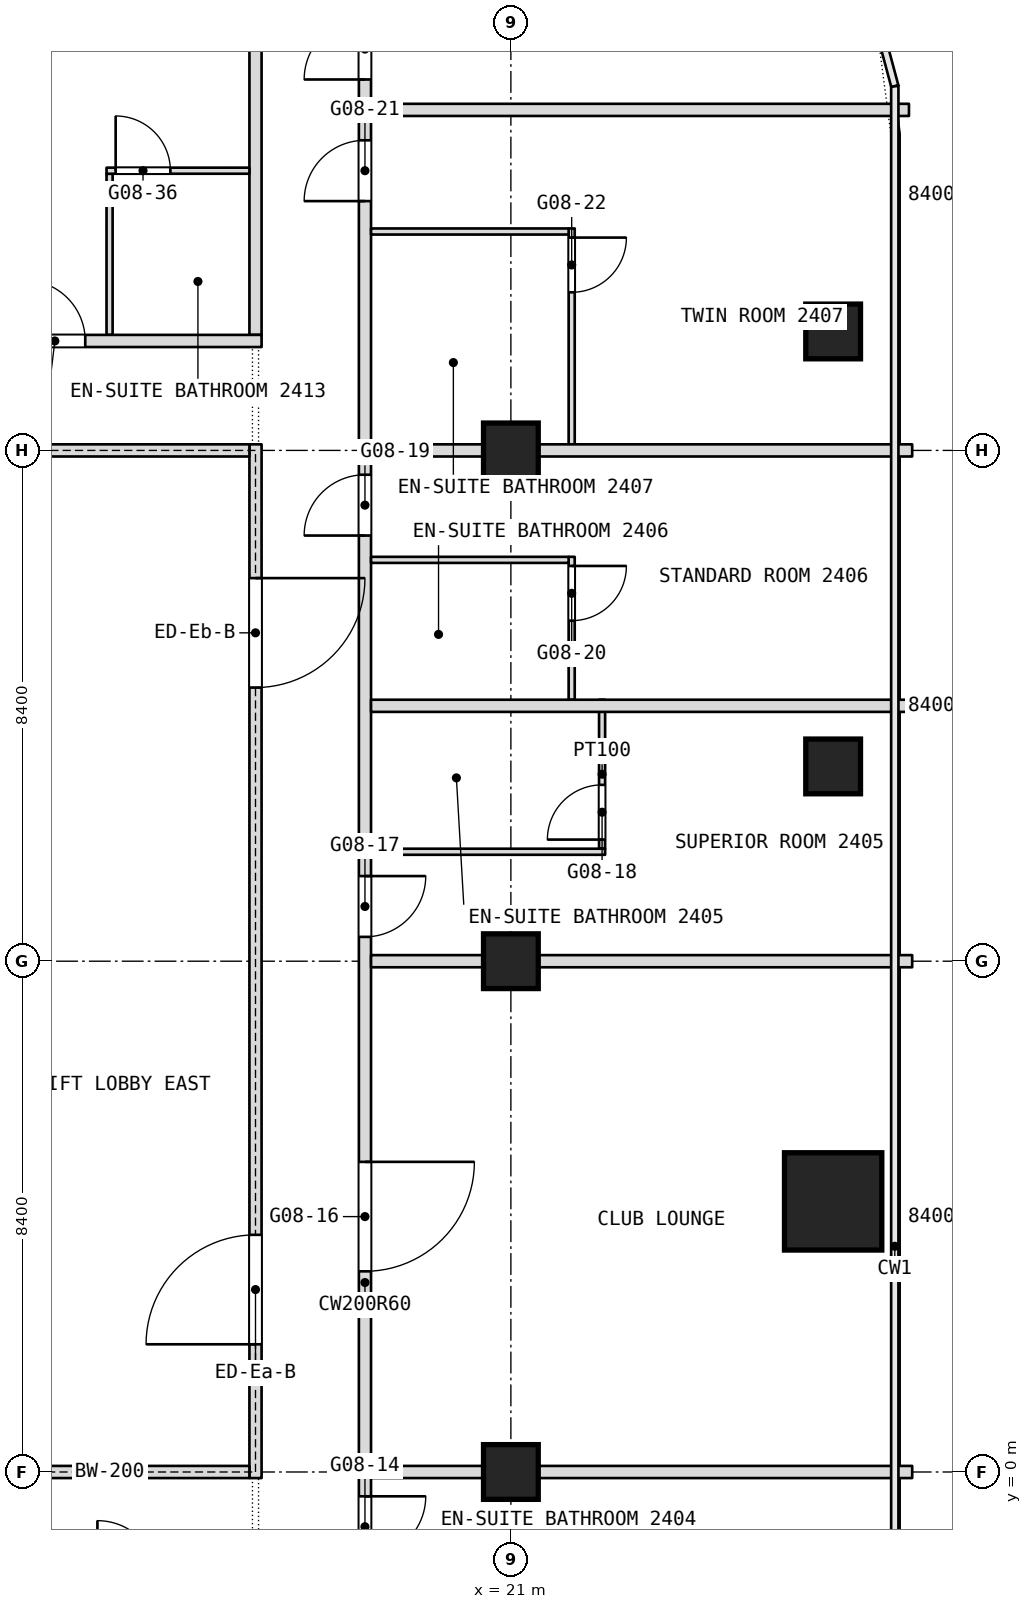
"""IFC4 building model, lengths in metres.
Left out: names, types, materials, properties, quantities, classifications, styles, units other than length and angle.
Written with IfcOpenShell. Run it as: python <this file> out.ifc"""

import sys

from ifc_helpers import new_model, si_unit, direction, frame, frame_2d, origin, origin_2d, place, context, subcontext, project, spatial, rectangle, extrude, element, fill, save


model = new_model("IFC4")
c1 = context("Model", 3, precision=1e-05, world=origin(), true_north=direction((0.0, 1.0)))
c2 = subcontext(c1, "Body", "Model", "MODEL_VIEW")
j1 = project(units=[si_unit("LENGTHUNIT", "METRE"), si_unit("PLANEANGLEUNIT", "RADIAN")], contexts=[c1])
p1 = place(None, origin())
s1 = spatial("IfcSite", under=j1, at=p1, CompositionType="ELEMENT")
p2 = place(p1, origin())
s2 = spatial("IfcBuilding", under=s1, at=p2, CompositionType="ELEMENT")
p3 = place(p2, frame((0.0, 0.0, 112.1)))
s3 = spatial("IfcBuildingStorey", under=s2, at=p3, CompositionType="ELEMENT", Elevation=112.1)
p4 = place(p3, frame((26.3, 4.45, 0.0), z_axis=(0.0, 0.0, 1.0), x_axis=(1.0, 0.0, 0.0)))
e1 = element("IfcColumn", 1, at=p4, inside=s3, PredefinedType="COLUMN", context=c2, shape_type="SweptSolid", body=[
    extrude(rectangle(XDim=1.6, YDim=1.6, at=origin_2d()), origin(), (0.0, 0.0, 1.0), 3.6),
])
for number, where, z_axis, x_axis in (
    (2, (21.0, 0.0, 0.0), (0.0, 0.0, 1.0), (1.0, 0.0, 0.0)),
    (3, (21.0, 8.4, 0.0), (0.0, 0.0, 1.0), (1.0, 0.0, 0.0)),
    (4, (21.0, 16.8, 0.0), (0.0, 0.0, 1.0), (1.0, 0.0, 0.0)),
    (5, (26.3, 18.756, 0.0), (0.0, 0.0, 1.0), (1.0, 0.0, 0.0)),
    (6, (26.3, 11.603, 0.0), (0.0, 0.0, 1.0), (1.0, 0.0, 0.0)),
):
    element("IfcColumn", number, at=place(p3, frame(where, z_axis=z_axis, x_axis=x_axis)), inside=s3, PredefinedType="COLUMN", context=c2, shape_type="SweptSolid", body=[
        extrude(rectangle(XDim=0.9, YDim=0.9, at=origin_2d()), origin(), (0.0, 0.0, 1.0), 3.6),
    ])
p5 = place(p3, frame((22.5, 10.25, 0.0), z_axis=(0.0, 0.0, 1.0), x_axis=(0.0, 1.0, 0.0)))
e7 = element("IfcWall", 7, at=p5, inside=s3, PredefinedType="PARTITIONING", context=c2, shape_type="SweptSolid", body=[
    extrude(rectangle(XDim=2.45, YDim=0.1, at=frame_2d((1.225, 0.0))), origin(), (0.0, 0.0, 1.0), 3.34),
])
p6 = place(p5, frame((0.15, 0.0, 0.0)))
e8 = element("IfcOpeningElement", 8, at=p6, cuts=e7, PredefinedType="OPENING", context=c2, shape_type="SweptSolid", body=[
    extrude(rectangle(XDim=0.9, YDim=2.1, at=frame_2d((0.45, 1.05))), frame((0.0, 0.05, 0.0), z_axis=(0.0, -1.0, 0.0), x_axis=(1.0, 0.0, 0.0)), (0.0, 0.0, 1.0), 0.1),
])
p7 = place(p3, frame((22.0, 12.7, 0.0), z_axis=(0.0, 0.0, 1.0), x_axis=(0.0, 1.0, 0.0)))
e9 = element("IfcWall", 9, at=p7, inside=s3, PredefinedType="PARTITIONING", context=c2, shape_type="SweptSolid", body=[
    extrude(rectangle(XDim=2.35, YDim=0.1, at=frame_2d((1.175, 0.0))), origin(), (0.0, 0.0, 1.0), 3.34),
])
p8 = place(p7, frame((1.3, 0.0, 0.0)))
e10 = element("IfcOpeningElement", 10, at=p8, cuts=e9, PredefinedType="OPENING", context=c2, shape_type="SweptSolid", body=[
    extrude(rectangle(XDim=0.9, YDim=2.1, at=frame_2d((0.45, 1.05))), frame((0.0, 0.05, 0.0), z_axis=(0.0, -1.0, 0.0), x_axis=(1.0, 0.0, 0.0)), (0.0, 0.0, 1.0), 0.1),
])
p9 = place(p3, frame((22.0, 16.9, 0.0), z_axis=(0.0, 0.0, 1.0), x_axis=(0.0, 1.0, 0.0)))
e11 = element("IfcWall", 11, at=p9, inside=s3, PredefinedType="PARTITIONING", context=c2, shape_type="SweptSolid", body=[
    extrude(rectangle(XDim=3.55, YDim=0.1, at=frame_2d((1.775, 0.0))), origin(), (0.0, 0.0, 1.0), 3.34),
])
p10 = place(p9, frame((2.5, 0.0, 0.0)))
e12 = element("IfcOpeningElement", 12, at=p10, cuts=e11, PredefinedType="OPENING", context=c2, shape_type="SweptSolid", body=[
    extrude(rectangle(XDim=0.9, YDim=2.1, at=frame_2d((0.45, 1.05))), frame((0.0, 0.05, 0.0), z_axis=(0.0, -1.0, 0.0), x_axis=(1.0, 0.0, 0.0)), (0.0, 0.0, 1.0), 0.1),
])
p11 = place(p3, frame((18.6, -21.708, 0.0), z_axis=(0.0, 0.0, 1.0), x_axis=(0.0, 1.0, 0.0)))
e13 = element("IfcWall", 13, at=p11, inside=s3, PredefinedType="PARTITIONING", context=c2, shape_type="SweptSolid", body=[
    extrude(rectangle(XDim=49.648, YDim=0.2, at=frame_2d((24.824, 0.0))), origin(), (0.0, 0.0, 1.0), 3.34),
])
p12 = place(p11, frame((2.204, 0.0, 0.0)))
e14 = element("IfcOpeningElement", 14, at=p12, cuts=e13, PredefinedType="OPENING", context=c2, shape_type="SweptSolid", body=[
    extrude(rectangle(XDim=1.0, YDim=2.1, at=frame_2d((0.5, 1.05))), frame((0.0, 0.1, 0.0), z_axis=(0.0, -1.0, 0.0), x_axis=(1.0, 0.0, 0.0)), (0.0, 0.0, 1.0), 0.2),
])
p13 = place(p11, frame((7.708, 0.0, 0.0)))
e15 = element("IfcOpeningElement", 15, at=p13, cuts=e13, PredefinedType="OPENING", context=c2, shape_type="SweptSolid", body=[
    extrude(rectangle(XDim=1.0, YDim=2.1, at=frame_2d((0.5, 1.05))), frame((0.0, 0.1, 0.0), z_axis=(0.0, -1.0, 0.0), x_axis=(1.0, 0.0, 0.0)), (0.0, 0.0, 1.0), 0.2),
])
p14 = place(p11, frame((9.508, 0.0, 0.0)))
e16 = element("IfcOpeningElement", 16, at=p14, cuts=e13, PredefinedType="OPENING", context=c2, shape_type="SweptSolid", body=[
    extrude(rectangle(XDim=1.0, YDim=2.1, at=frame_2d((0.5, 1.05))), frame((0.0, 0.1, 0.0), z_axis=(0.0, -1.0, 0.0), x_axis=(1.0, 0.0, 0.0)), (0.0, 0.0, 1.0), 0.2),
])
p15 = place(p11, frame((13.708, 0.0, 0.0)))
e17 = element("IfcOpeningElement", 17, at=p15, cuts=e13, PredefinedType="OPENING", context=c2, shape_type="SweptSolid", body=[
    extrude(rectangle(XDim=1.0, YDim=2.1, at=frame_2d((0.5, 1.05))), frame((0.0, 0.1, 0.0), z_axis=(0.0, -1.0, 0.0), x_axis=(1.0, 0.0, 0.0)), (0.0, 0.0, 1.0), 0.2),
])
p16 = place(p11, frame((20.308, 0.0, 0.0)))
e18 = element("IfcOpeningElement", 18, at=p16, cuts=e13, PredefinedType="OPENING", context=c2, shape_type="SweptSolid", body=[
    extrude(rectangle(XDim=1.0, YDim=2.1, at=frame_2d((0.5, 1.05))), frame((0.0, 0.1, 0.0), z_axis=(0.0, -1.0, 0.0), x_axis=(1.0, 0.0, 0.0)), (0.0, 0.0, 1.0), 0.2),
])
p17 = place(p11, frame((25.008, 0.0, 0.0)))
e19 = element("IfcOpeningElement", 19, at=p17, cuts=e13, PredefinedType="OPENING", context=c2, shape_type="SweptSolid", body=[
    extrude(rectangle(XDim=1.8, YDim=2.1, at=frame_2d((0.9, 1.05))), frame((0.0, 0.1, 0.0), z_axis=(0.0, -1.0, 0.0), x_axis=(1.0, 0.0, 0.0)), (0.0, 0.0, 1.0), 0.2),
])
p18 = place(p11, frame((30.508, 0.0, 0.0)))
e20 = element("IfcOpeningElement", 20, at=p18, cuts=e13, PredefinedType="OPENING", context=c2, shape_type="SweptSolid", body=[
    extrude(rectangle(XDim=1.0, YDim=2.1, at=frame_2d((0.5, 1.05))), frame((0.0, 0.1, 0.0), z_axis=(0.0, -1.0, 0.0), x_axis=(1.0, 0.0, 0.0)), (0.0, 0.0, 1.0), 0.2),
])
p19 = place(p11, frame((37.108, 0.0, 0.0)))
e21 = element("IfcOpeningElement", 21, at=p19, cuts=e13, PredefinedType="OPENING", context=c2, shape_type="SweptSolid", body=[
    extrude(rectangle(XDim=1.0, YDim=2.1, at=frame_2d((0.5, 1.05))), frame((0.0, 0.1, 0.0), z_axis=(0.0, -1.0, 0.0), x_axis=(1.0, 0.0, 0.0)), (0.0, 0.0, 1.0), 0.2),
])
p20 = place(p11, frame((42.608, 0.0, 0.0)))
e22 = element("IfcOpeningElement", 22, at=p20, cuts=e13, PredefinedType="OPENING", context=c2, shape_type="SweptSolid", body=[
    extrude(rectangle(XDim=1.0, YDim=2.1, at=frame_2d((0.5, 1.05))), frame((0.0, 0.1, 0.0), z_axis=(0.0, -1.0, 0.0), x_axis=(1.0, 0.0, 0.0)), (0.0, 0.0, 1.0), 0.2),
])
p21 = place(p11, frame((44.608, 0.0, 0.0)))
e23 = element("IfcOpeningElement", 23, at=p21, cuts=e13, PredefinedType="OPENING", context=c2, shape_type="SweptSolid", body=[
    extrude(rectangle(XDim=1.0, YDim=2.1, at=frame_2d((0.5, 1.05))), frame((0.0, 0.1, 0.0), z_axis=(0.0, -1.0, 0.0), x_axis=(1.0, 0.0, 0.0)), (0.0, 0.0, 1.0), 0.2),
])
p22 = place(p3, frame((16.8, 18.7, 0.0), z_axis=(0.0, 0.0, 1.0), x_axis=(0.0, 1.0, 0.0)))
e24 = element("IfcWall", 24, at=p22, inside=s3, PredefinedType="PARTITIONING", context=c2, shape_type="SweptSolid", body=[
    extrude(rectangle(XDim=9.24, YDim=0.2, at=frame_2d((4.62, 0.0))), origin(), (0.0, 0.0, 1.0), 3.34),
])
p23 = place(p3, frame((14.4, 18.7, 0.0), z_axis=(0.0, 0.0, 1.0), x_axis=(0.0, 1.0, 0.0)))
e25 = element("IfcWall", 25, at=p23, inside=s3, PredefinedType="PARTITIONING", context=c2, shape_type="SweptSolid", body=[
    extrude(rectangle(XDim=2.65, YDim=0.1, at=frame_2d((1.325, 0.0))), origin(), (0.0, 0.0, 1.0), 3.34),
])
for number, where, z_axis, x_axis in (
    (26, (18.7, 0.0, 0.0), (0.0, 0.0, 1.0), (1.0, 0.0, 0.0)),
    (27, (18.7, 8.4, 0.0), (0.0, 0.0, 1.0), (1.0, 0.0, 0.0)),
):
    element("IfcWall", number, at=place(p3, frame(where, z_axis=z_axis, x_axis=x_axis)), inside=s3, PredefinedType="PARTITIONING", context=c2, shape_type="SweptSolid", body=[
        extrude(rectangle(XDim=8.9, YDim=0.2, at=frame_2d((4.45, 0.0))), origin(), (0.0, 0.0, 1.0), 2.89),
    ])
p24 = place(p3, frame((18.7, 10.2, 0.0), z_axis=(0.0, 0.0, 1.0), x_axis=(1.0, 0.0, 0.0)))
e28 = element("IfcWall", 28, at=p24, inside=s3, PredefinedType="PARTITIONING", context=c2, shape_type="SweptSolid", body=[
    extrude(rectangle(XDim=3.85, YDim=0.1, at=frame_2d((1.925, 0.0))), origin(), (0.0, 0.0, 1.0), 3.34),
])
p25 = place(p3, frame((18.7, 12.6, 0.0), z_axis=(0.0, 0.0, 1.0), x_axis=(1.0, 0.0, 0.0)))
e29 = element("IfcWall", 29, at=p25, inside=s3, PredefinedType="PARTITIONING", context=c2, shape_type="SweptSolid", body=[
    extrude(rectangle(XDim=8.9, YDim=0.2, at=frame_2d((4.45, 0.0))), origin(), (0.0, 0.0, 1.0), 3.34),
])
p26 = place(p3, frame((18.7, 15.0, 0.0), z_axis=(0.0, 0.0, 1.0), x_axis=(1.0, 0.0, 0.0)))
e30 = element("IfcWall", 30, at=p26, inside=s3, PredefinedType="PARTITIONING", context=c2, shape_type="SweptSolid", body=[
    extrude(rectangle(XDim=3.25, YDim=0.1, at=frame_2d((1.625, 0.0))), origin(), (0.0, 0.0, 1.0), 3.34),
])
p27 = place(p3, frame((18.7, 16.8, 0.0), z_axis=(0.0, 0.0, 1.0), x_axis=(1.0, 0.0, 0.0)))
e31 = element("IfcWall", 31, at=p27, inside=s3, PredefinedType="PARTITIONING", context=c2, shape_type="SweptSolid", body=[
    extrude(rectangle(XDim=8.9, YDim=0.2, at=frame_2d((4.45, 0.0))), origin(), (0.0, 0.0, 1.0), 2.89),
])
p28 = place(p3, frame((10.7, 18.6, 0.0), z_axis=(0.0, 0.0, 1.0), x_axis=(1.0, 0.0, 0.0)))
e32 = element("IfcWall", 32, at=p28, inside=s3, PredefinedType="PARTITIONING", context=c2, shape_type="SweptSolid", body=[
    extrude(rectangle(XDim=6.2, YDim=0.2, at=frame_2d((3.1, 0.0))), origin(), (0.0, 0.0, 1.0), 3.34),
])
p29 = place(p28, frame((2.3, 0.0, 0.0)))
e33 = element("IfcOpeningElement", 33, at=p29, cuts=e32, PredefinedType="OPENING", context=c2, shape_type="SweptSolid", body=[
    extrude(rectangle(XDim=1.0, YDim=2.1, at=frame_2d((0.5, 1.05))), frame((0.0, 0.1, 0.0), z_axis=(0.0, -1.0, 0.0), x_axis=(1.0, 0.0, 0.0)), (0.0, 0.0, 1.0), 0.2),
])
p30 = place(p3, frame((18.7, 20.4, 0.0), z_axis=(0.0, 0.0, 1.0), x_axis=(1.0, 0.0, 0.0)))
e34 = element("IfcWall", 34, at=p30, inside=s3, PredefinedType="PARTITIONING", context=c2, shape_type="SweptSolid", body=[
    extrude(rectangle(XDim=3.25, YDim=0.1, at=frame_2d((1.625, 0.0))), origin(), (0.0, 0.0, 1.0), 3.34),
])
p31 = place(p3, frame((14.35, 21.4, 0.0), z_axis=(0.0, 0.0, 1.0), x_axis=(1.0, 0.0, 0.0)))
e35 = element("IfcWall", 35, at=p31, inside=s3, PredefinedType="PARTITIONING", context=c2, shape_type="SweptSolid", body=[
    extrude(rectangle(XDim=2.35, YDim=0.1, at=frame_2d((1.175, 0.0))), origin(), (0.0, 0.0, 1.0), 3.34),
])
p32 = place(p31, frame((0.15, 0.0, 0.0)))
e36 = element("IfcOpeningElement", 36, at=p32, cuts=e35, PredefinedType="OPENING", context=c2, shape_type="SweptSolid", body=[
    extrude(rectangle(XDim=0.9, YDim=2.1, at=frame_2d((0.45, 1.05))), frame((0.0, 0.05, 0.0), z_axis=(0.0, -1.0, 0.0), x_axis=(1.0, 0.0, 0.0)), (0.0, 0.0, 1.0), 0.1),
])
p33 = place(p3, frame((18.7, 22.4, 0.0), z_axis=(0.0, 0.0, 1.0), x_axis=(1.0, 0.0, 0.0)))
e37 = element("IfcWall", 37, at=p33, inside=s3, PredefinedType="PARTITIONING", context=c2, shape_type="SweptSolid", body=[
    extrude(rectangle(XDim=8.847, YDim=0.2, at=frame_2d((4.424, 0.0))), origin(), (0.0, 0.0, 1.0), 3.34),
])
p34 = place(p3, frame((16.8, -0.1, 0.0), z_axis=(0.0, 0.0, 1.0), x_axis=(0.0, 1.0, 0.0)))
e38 = element("IfcWall", 38, at=p34, inside=s3, PredefinedType="PARTITIONING", context=c2, shape_type="SweptSolid", body=[
    extrude(rectangle(XDim=17.0, YDim=0.2, at=frame_2d((8.5, 0.0))), origin(), (0.0, 0.0, 1.0), 3.34),
])
p35 = place(p34, frame((2.2, 0.0, 0.0)))
e39 = element("IfcOpeningElement", 39, at=p35, cuts=e38, PredefinedType="OPENING", context=c2, shape_type="SweptSolid", body=[
    extrude(rectangle(XDim=1.8, YDim=2.1, at=frame_2d((0.9, 1.05))), frame((0.0, 0.1, 0.0), z_axis=(0.0, -1.0, 0.0), x_axis=(1.0, 0.0, 0.0)), (0.0, 0.0, 1.0), 0.2),
])
p36 = place(p34, frame((13.0, 0.0, 0.0)))
e40 = element("IfcOpeningElement", 40, at=p36, cuts=e38, PredefinedType="OPENING", context=c2, shape_type="SweptSolid", body=[
    extrude(rectangle(XDim=1.8, YDim=2.1, at=frame_2d((0.9, 1.05))), frame((0.0, 0.1, 0.0), z_axis=(0.0, -1.0, 0.0), x_axis=(1.0, 0.0, 0.0)), (0.0, 0.0, 1.0), 0.2),
])
for number, where, z_axis, x_axis in (
    (41, (12.1, 0.0, 0.0), (0.0, 0.0, 1.0), (1.0, 0.0, 0.0)),
    (42, (12.1, 16.8, 0.0), (0.0, 0.0, 1.0), (1.0, 0.0, 0.0)),
):
    element("IfcWall", number, at=place(p3, frame(where, z_axis=z_axis, x_axis=x_axis)), inside=s3, PredefinedType="PARTITIONING", context=c2, shape_type="SweptSolid", body=[
        extrude(rectangle(XDim=4.6, YDim=0.2, at=frame_2d((2.3, 0.0))), origin(), (0.0, 0.0, 1.0), 2.89),
    ])
p37 = place(p6, origin())
e43 = element("IfcDoor", 43, at=p37, inside=s3, OperationType="SINGLE_SWING_LEFT", PredefinedType="DOOR", context=c2, shape_type="SweptSolid", body=[
    extrude(rectangle(XDim=0.9, YDim=2.1, at=frame_2d((0.45, 1.05))), frame((0.0, 0.025, 0.0), z_axis=(0.0, -1.0, 0.0), x_axis=(1.0, 0.0, 0.0)), (0.0, 0.0, 1.0), 0.05),
])
fill(e8, e43)
p38 = place(p8, origin())
e44 = element("IfcDoor", 44, at=p38, inside=s3, OperationType="SINGLE_SWING_RIGHT", PredefinedType="DOOR", context=c2, shape_type="SweptSolid", body=[
    extrude(rectangle(XDim=0.9, YDim=2.1, at=frame_2d((0.45, 1.05))), frame((0.0, 0.025, 0.0), z_axis=(0.0, -1.0, 0.0), x_axis=(1.0, 0.0, 0.0)), (0.0, 0.0, 1.0), 0.05),
])
fill(e10, e44)
p39 = place(p10, origin())
e45 = element("IfcDoor", 45, at=p39, inside=s3, OperationType="SINGLE_SWING_RIGHT", PredefinedType="DOOR", context=c2, shape_type="SweptSolid", body=[
    extrude(rectangle(XDim=0.9, YDim=2.1, at=frame_2d((0.45, 1.05))), frame((0.0, 0.025, 0.0), z_axis=(0.0, -1.0, 0.0), x_axis=(1.0, 0.0, 0.0)), (0.0, 0.0, 1.0), 0.05),
])
fill(e12, e45)
p40 = place(p16, origin())
e46 = element("IfcDoor", 46, at=p40, inside=s3, OperationType="SINGLE_SWING_RIGHT", PredefinedType="DOOR", context=c2, shape_type="SweptSolid", body=[
    extrude(rectangle(XDim=1.0, YDim=2.1, at=frame_2d((0.5, 1.05))), frame((0.0, 0.025, 0.0), z_axis=(0.0, -1.0, 0.0), x_axis=(1.0, 0.0, 0.0)), (0.0, 0.0, 1.0), 0.05),
])
fill(e18, e46)
p41 = place(p17, origin())
e47 = element("IfcDoor", 47, at=p41, inside=s3, OperationType="DOUBLE_DOOR_SINGLE_SWING", PredefinedType="DOOR", context=c2, shape_type="SweptSolid", body=[
    extrude(rectangle(XDim=1.8, YDim=2.1, at=frame_2d((0.9, 1.05))), frame((0.0, 0.025, 0.0), z_axis=(0.0, -1.0, 0.0), x_axis=(1.0, 0.0, 0.0)), (0.0, 0.0, 1.0), 0.05),
])
fill(e19, e47)
p42 = place(p18, origin())
e48 = element("IfcDoor", 48, at=p42, inside=s3, OperationType="SINGLE_SWING_LEFT", PredefinedType="DOOR", context=c2, shape_type="SweptSolid", body=[
    extrude(rectangle(XDim=1.0, YDim=2.1, at=frame_2d((0.5, 1.05))), frame((0.0, 0.025, 0.0), z_axis=(0.0, -1.0, 0.0), x_axis=(1.0, 0.0, 0.0)), (0.0, 0.0, 1.0), 0.05),
])
fill(e20, e48)
p43 = place(p19, origin())
e49 = element("IfcDoor", 49, at=p43, inside=s3, OperationType="SINGLE_SWING_LEFT", PredefinedType="DOOR", context=c2, shape_type="SweptSolid", body=[
    extrude(rectangle(XDim=1.0, YDim=2.1, at=frame_2d((0.5, 1.05))), frame((0.0, 0.025, 0.0), z_axis=(0.0, -1.0, 0.0), x_axis=(1.0, 0.0, 0.0)), (0.0, 0.0, 1.0), 0.05),
])
fill(e21, e49)
p44 = place(p20, origin())
e50 = element("IfcDoor", 50, at=p44, inside=s3, OperationType="SINGLE_SWING_LEFT", PredefinedType="DOOR", context=c2, shape_type="SweptSolid", body=[
    extrude(rectangle(XDim=1.0, YDim=2.1, at=frame_2d((0.5, 1.05))), frame((0.0, 0.025, 0.0), z_axis=(0.0, -1.0, 0.0), x_axis=(1.0, 0.0, 0.0)), (0.0, 0.0, 1.0), 0.05),
])
fill(e22, e50)
p45 = place(p21, origin())
e51 = element("IfcDoor", 51, at=p45, inside=s3, OperationType="SINGLE_SWING_LEFT", PredefinedType="DOOR", context=c2, shape_type="SweptSolid", body=[
    extrude(rectangle(XDim=1.0, YDim=2.1, at=frame_2d((0.5, 1.05))), frame((0.0, 0.025, 0.0), z_axis=(0.0, -1.0, 0.0), x_axis=(1.0, 0.0, 0.0)), (0.0, 0.0, 1.0), 0.05),
])
fill(e23, e51)
p46 = place(p29, origin())
e52 = element("IfcDoor", 52, at=p46, inside=s3, OperationType="SINGLE_SWING_RIGHT", PredefinedType="DOOR", context=c2, shape_type="SweptSolid", body=[
    extrude(rectangle(XDim=1.0, YDim=2.1, at=frame_2d((0.5, 1.05))), frame((0.0, 0.025, 0.0), z_axis=(0.0, -1.0, 0.0), x_axis=(1.0, 0.0, 0.0)), (0.0, 0.0, 1.0), 0.05),
])
fill(e33, e52)
p47 = place(p32, origin())
e53 = element("IfcDoor", 53, at=p47, inside=s3, OperationType="SINGLE_SWING_RIGHT", PredefinedType="DOOR", context=c2, shape_type="SweptSolid", body=[
    extrude(rectangle(XDim=0.9, YDim=2.1, at=frame_2d((0.45, 1.05))), frame((0.0, 0.025, 0.0), z_axis=(0.0, -1.0, 0.0), x_axis=(1.0, 0.0, 0.0)), (0.0, 0.0, 1.0), 0.05),
])
fill(e36, e53)
p48 = place(p35, origin())
e54 = element("IfcDoor", 54, at=p48, inside=s3, OperationType="DOUBLE_DOOR_SINGLE_SWING", PredefinedType="DOOR", context=c2, shape_type="SweptSolid", body=[
    extrude(rectangle(XDim=1.8, YDim=2.1, at=frame_2d((0.9, 1.05))), frame((0.0, 0.025, 0.0), z_axis=(0.0, -1.0, 0.0), x_axis=(1.0, 0.0, 0.0)), (0.0, 0.0, 1.0), 0.05),
])
fill(e39, e54)
p49 = place(p36, origin())
e55 = element("IfcDoor", 55, at=p49, inside=s3, OperationType="DOUBLE_DOOR_SINGLE_SWING", PredefinedType="DOOR", context=c2, shape_type="SweptSolid", body=[
    extrude(rectangle(XDim=1.8, YDim=2.1, at=frame_2d((0.9, 1.05))), frame((0.0, 0.025, 0.0), z_axis=(0.0, -1.0, 0.0), x_axis=(1.0, 0.0, 0.0)), (0.0, 0.0, 1.0), 0.05),
])
fill(e40, e55)
save(model, sys.argv[1])
